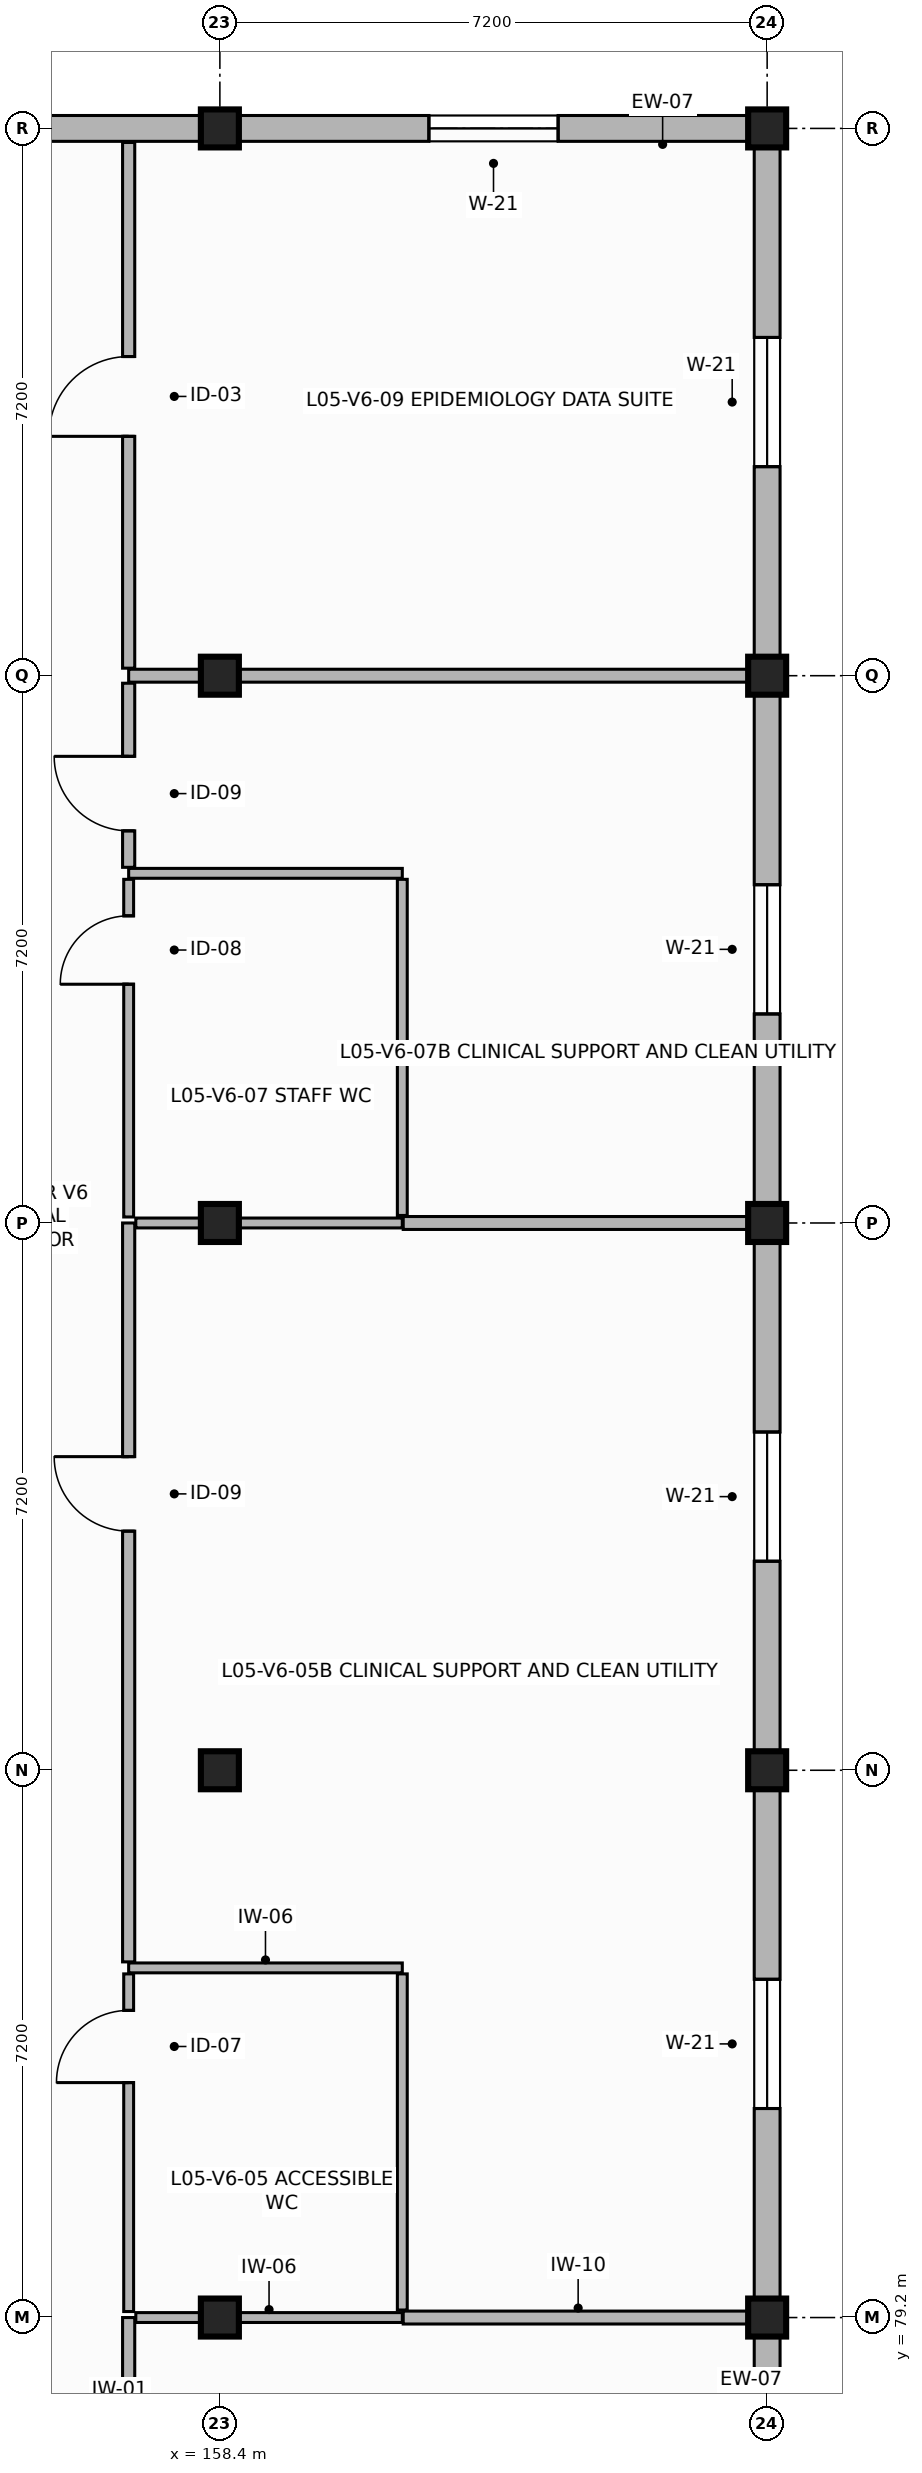
"""IFC4 building model, lengths in metres.
Left out: names, types, materials, properties, quantities, classifications, styles, units other than length and angle.
Written with IfcOpenShell. Run it as: python <this file> out.ifc"""

import sys

from ifc_helpers import new_model, si_unit, direction, frame, frame_2d, origin, origin_2d, place, context, subcontext, project, spatial, rectangle, extrude, element, fill, save


model = new_model("IFC4")
c1 = context("Model", 3, precision=1e-05, world=origin(), true_north=direction((0.0, 1.0)))
c2 = subcontext(c1, "Body", "Model", "MODEL_VIEW")
j1 = project(units=[si_unit("LENGTHUNIT", "METRE"), si_unit("PLANEANGLEUNIT", "RADIAN")], contexts=[c1])
p1 = place(None, origin())
s1 = spatial("IfcSite", under=j1, at=p1, CompositionType="ELEMENT")
p2 = place(p1, origin())
s2 = spatial("IfcBuilding", under=s1, at=p2, CompositionType="ELEMENT")
p3 = place(p2, frame((0.0, 0.0, 19.7)))
s3 = spatial("IfcBuildingStorey", under=s2, at=p3, CompositionType="ELEMENT", Elevation=19.7)
for number, where, z_axis, x_axis in (
    (1, (158.4, 79.2, 0.0), (0.0, 0.0, 1.0), (1.0, 0.0, 0.0)),
    (2, (158.4, 86.4, 0.0), (0.0, 0.0, 1.0), (1.0, 0.0, 0.0)),
    (3, (158.4, 93.6, 0.0), (0.0, 0.0, 1.0), (1.0, 0.0, 0.0)),
    (4, (158.4, 100.8, 0.0), (0.0, 0.0, 1.0), (1.0, 0.0, 0.0)),
    (5, (158.4, 108.0, 0.0), (0.0, 0.0, 1.0), (1.0, 0.0, 0.0)),
    (6, (165.6, 79.2, 0.0), (0.0, 0.0, 1.0), (1.0, 0.0, 0.0)),
    (7, (165.6, 86.4, 0.0), (0.0, 0.0, 1.0), (1.0, 0.0, 0.0)),
    (8, (165.6, 93.6, 0.0), (0.0, 0.0, 1.0), (1.0, 0.0, 0.0)),
    (9, (165.6, 100.8, 0.0), (0.0, 0.0, 1.0), (1.0, 0.0, 0.0)),
    (10, (165.6, 108.0, 0.0), (0.0, 0.0, 1.0), (1.0, 0.0, 0.0)),
):
    element("IfcColumn", number, at=place(p3, frame(where, z_axis=z_axis, x_axis=x_axis)), inside=s3, PredefinedType="COLUMN", context=c2, shape_type="SweptSolid", body=[
        extrude(rectangle(XDim=0.5, YDim=0.5, at=origin_2d()), origin(), (0.0, 0.0, 1.0), 3.46),
    ])
p4 = place(p3, frame((165.6, 72.0, 0.0), z_axis=(0.0, 0.0, 1.0), x_axis=(0.0, 1.0, 0.0)))
e11 = element("IfcWall", 11, at=p4, inside=s3, PredefinedType="SOLIDWALL", context=c2, shape_type="SweptSolid", body=[
    extrude(rectangle(XDim=7.2, YDim=0.34, at=frame_2d((3.6, 0.0))), origin(), (0.0, 0.0, 1.0), 2.79),
])
p5 = place(p4, frame((2.75, 0.0, 0.85)))
e12 = element("IfcOpeningElement", 12, at=p5, cuts=e11, PredefinedType="OPENING", context=c2, shape_type="SweptSolid", body=[
    extrude(rectangle(XDim=1.7, YDim=1.65, at=frame_2d((0.85, 0.825))), frame((0.0, 0.18, 0.0), z_axis=(0.0, -1.0, 0.0), x_axis=(1.0, 0.0, 0.0)), (0.0, 0.0, 1.0), 0.36),
])
p6 = place(p3, frame((165.6, 79.2, 0.0), z_axis=(0.0, 0.0, 1.0), x_axis=(0.0, 1.0, 0.0)))
e13 = element("IfcWall", 13, at=p6, inside=s3, PredefinedType="SOLIDWALL", context=c2, shape_type="SweptSolid", body=[
    extrude(rectangle(XDim=7.2, YDim=0.34, at=frame_2d((3.6, 0.0))), origin(), (0.0, 0.0, 1.0), 2.79),
])
p7 = place(p6, frame((2.75, 0.0, 0.85)))
e14 = element("IfcOpeningElement", 14, at=p7, cuts=e13, PredefinedType="OPENING", context=c2, shape_type="SweptSolid", body=[
    extrude(rectangle(XDim=1.7, YDim=1.65, at=frame_2d((0.85, 0.825))), frame((0.0, 0.18, 0.0), z_axis=(0.0, -1.0, 0.0), x_axis=(1.0, 0.0, 0.0)), (0.0, 0.0, 1.0), 0.36),
])
p8 = place(p3, frame((165.6, 86.4, 0.0), z_axis=(0.0, 0.0, 1.0), x_axis=(0.0, 1.0, 0.0)))
e15 = element("IfcWall", 15, at=p8, inside=s3, PredefinedType="SOLIDWALL", context=c2, shape_type="SweptSolid", body=[
    extrude(rectangle(XDim=7.2, YDim=0.34, at=frame_2d((3.6, 0.0))), origin(), (0.0, 0.0, 1.0), 2.79),
])
p9 = place(p8, frame((2.75, 0.0, 0.85)))
e16 = element("IfcOpeningElement", 16, at=p9, cuts=e15, PredefinedType="OPENING", context=c2, shape_type="SweptSolid", body=[
    extrude(rectangle(XDim=1.7, YDim=1.65, at=frame_2d((0.85, 0.825))), frame((0.0, 0.18, 0.0), z_axis=(0.0, -1.0, 0.0), x_axis=(1.0, 0.0, 0.0)), (0.0, 0.0, 1.0), 0.36),
])
p10 = place(p3, frame((165.6, 93.6, 0.0), z_axis=(0.0, 0.0, 1.0), x_axis=(0.0, 1.0, 0.0)))
e17 = element("IfcWall", 17, at=p10, inside=s3, PredefinedType="SOLIDWALL", context=c2, shape_type="SweptSolid", body=[
    extrude(rectangle(XDim=7.2, YDim=0.34, at=frame_2d((3.6, 0.0))), origin(), (0.0, 0.0, 1.0), 2.79),
])
p11 = place(p10, frame((2.75, 0.0, 0.85)))
e18 = element("IfcOpeningElement", 18, at=p11, cuts=e17, PredefinedType="OPENING", context=c2, shape_type="SweptSolid", body=[
    extrude(rectangle(XDim=1.7, YDim=1.65, at=frame_2d((0.85, 0.825))), frame((0.0, 0.18, 0.0), z_axis=(0.0, -1.0, 0.0), x_axis=(1.0, 0.0, 0.0)), (0.0, 0.0, 1.0), 0.36),
])
p12 = place(p3, frame((165.6, 100.8, 0.0), z_axis=(0.0, 0.0, 1.0), x_axis=(0.0, 1.0, 0.0)))
e19 = element("IfcWall", 19, at=p12, inside=s3, PredefinedType="SOLIDWALL", context=c2, shape_type="SweptSolid", body=[
    extrude(rectangle(XDim=7.2, YDim=0.34, at=frame_2d((3.6, 0.0))), origin(), (0.0, 0.0, 1.0), 2.79),
])
p13 = place(p12, frame((2.75, 0.0, 0.85)))
e20 = element("IfcOpeningElement", 20, at=p13, cuts=e19, PredefinedType="OPENING", context=c2, shape_type="SweptSolid", body=[
    extrude(rectangle(XDim=1.7, YDim=1.65, at=frame_2d((0.85, 0.825))), frame((0.0, 0.18, 0.0), z_axis=(0.0, -1.0, 0.0), x_axis=(1.0, 0.0, 0.0)), (0.0, 0.0, 1.0), 0.36),
])
p14 = place(p3, frame((165.6, 108.0, 0.0), z_axis=(0.0, 0.0, 1.0), x_axis=(-1.0, 0.0, 0.0)))
e21 = element("IfcWall", 21, at=p14, inside=s3, PredefinedType="SOLIDWALL", context=c2, shape_type="SweptSolid", body=[
    extrude(rectangle(XDim=7.2, YDim=0.34, at=frame_2d((3.6, 0.0))), origin(), (0.0, 0.0, 1.0), 2.79),
])
p15 = place(p14, frame((2.75, 0.0, 0.85)))
e22 = element("IfcOpeningElement", 22, at=p15, cuts=e21, PredefinedType="OPENING", context=c2, shape_type="SweptSolid", body=[
    extrude(rectangle(XDim=1.7, YDim=1.65, at=frame_2d((0.85, 0.825))), frame((0.0, 0.18, 0.0), z_axis=(0.0, -1.0, 0.0), x_axis=(1.0, 0.0, 0.0)), (0.0, 0.0, 1.0), 0.36),
])
p16 = place(p3, frame((158.4, 108.0, 0.0), z_axis=(0.0, 0.0, 1.0), x_axis=(-1.0, 0.0, 0.0)))
e23 = element("IfcWall", 23, at=p16, inside=s3, PredefinedType="SOLIDWALL", context=c2, shape_type="SweptSolid", body=[
    extrude(rectangle(XDim=7.2, YDim=0.34, at=frame_2d((3.6, 0.0))), origin(), (0.0, 0.0, 1.0), 2.79),
])
p17 = place(p3, frame((157.2, 72.185, 0.0), z_axis=(0.0, 0.0, 1.0), x_axis=(0.0, 1.0, 0.0)))
e24 = element("IfcWall", 24, at=p17, inside=s3, PredefinedType="PARTITIONING", context=c2, shape_type="SweptSolid", body=[
    extrude(rectangle(XDim=7.015, YDim=0.16, at=frame_2d((3.507, 0.0))), origin(), (0.0, 0.0, 1.0), 2.78),
])
p18 = place(p17, frame((3.017, 0.0, 0.0)))
e25 = element("IfcOpeningElement", 25, at=p18, cuts=e24, PredefinedType="OPENING", context=c2, shape_type="SweptSolid", body=[
    extrude(rectangle(XDim=0.98, YDim=2.15, at=frame_2d((0.49, 1.075))), frame((0.0, 0.09, 0.0), z_axis=(0.0, -1.0, 0.0), x_axis=(1.0, 0.0, 0.0)), (0.0, 0.0, 1.0), 0.18),
])
p19 = place(p3, frame((157.294, 79.2, 0.0), z_axis=(0.0, 0.0, 1.0), x_axis=(1.0, 0.0, 0.0)))
e26 = element("IfcWall", 26, at=p19, inside=s3, PredefinedType="PARTITIONING", context=c2, shape_type="SweptSolid", body=[
    extrude(rectangle(XDim=3.506, YDim=0.13, at=frame_2d((1.753, 0.0))), origin(), (0.0, 0.0, 1.0), 2.78),
])
p20 = place(p3, frame((160.812, 79.2, 0.0), z_axis=(0.0, 0.0, 1.0), x_axis=(1.0, 0.0, 0.0)))
e27 = element("IfcWall", 27, at=p20, inside=s3, PredefinedType="PARTITIONING", context=c2, shape_type="SweptSolid", body=[
    extrude(rectangle(XDim=4.603, YDim=0.17, at=frame_2d((2.302, 0.0))), origin(), (0.0, 0.0, 1.0), 2.78),
])
p21 = place(p3, frame((157.2, 83.8, 0.0), z_axis=(0.0, 0.0, 1.0), x_axis=(1.0, 0.0, 0.0)))
e28 = element("IfcWall", 28, at=p21, inside=s3, PredefinedType="PARTITIONING", context=c2, shape_type="SweptSolid", body=[
    extrude(rectangle(XDim=3.6, YDim=0.13, at=frame_2d((1.8, 0.0))), origin(), (0.0, 0.0, 1.0), 2.78),
])
p22 = place(p3, frame((160.8, 83.721, 0.0), z_axis=(0.0, 0.0, 1.0), x_axis=(0.0, -1.0, 0.0)))
e29 = element("IfcWall", 29, at=p22, inside=s3, PredefinedType="PARTITIONING", context=c2, shape_type="SweptSolid", body=[
    extrude(rectangle(XDim=4.422, YDim=0.13, at=frame_2d((2.211, 0.0))), origin(), (0.0, 0.0, 1.0), 2.78),
])
p23 = place(p3, frame((157.2, 79.279, 0.0), z_axis=(0.0, 0.0, 1.0), x_axis=(0.0, 1.0, 0.0)))
e30 = element("IfcWall", 30, at=p23, inside=s3, PredefinedType="PARTITIONING", context=c2, shape_type="SweptSolid", body=[
    extrude(rectangle(XDim=4.442, YDim=0.13, at=frame_2d((2.221, 0.0))), origin(), (0.0, 0.0, 1.0), 2.78),
])
p24 = place(p23, frame((3.012, 0.0, 0.0)))
e31 = element("IfcOpeningElement", 31, at=p24, cuts=e30, PredefinedType="OPENING", context=c2, shape_type="SweptSolid", body=[
    extrude(rectangle(XDim=0.95, YDim=2.1, at=frame_2d((0.475, 1.05))), frame((0.0, 0.075, 0.0), z_axis=(0.0, -1.0, 0.0), x_axis=(1.0, 0.0, 0.0)), (0.0, 0.0, 1.0), 0.15),
])
p25 = place(p3, frame((157.2, 83.879, 0.0), z_axis=(0.0, 0.0, 1.0), x_axis=(0.0, 1.0, 0.0)))
e32 = element("IfcWall", 32, at=p25, inside=s3, PredefinedType="PARTITIONING", context=c2, shape_type="SweptSolid", body=[
    extrude(rectangle(XDim=9.721, YDim=0.16, at=frame_2d((4.861, 0.0))), origin(), (0.0, 0.0, 1.0), 2.78),
])
p26 = place(p25, frame((5.667, 0.0, 0.0)))
e33 = element("IfcOpeningElement", 33, at=p26, cuts=e32, PredefinedType="OPENING", context=c2, shape_type="SweptSolid", body=[
    extrude(rectangle(XDim=0.98, YDim=2.15, at=frame_2d((0.49, 1.075))), frame((0.0, 0.09, 0.0), z_axis=(0.0, -1.0, 0.0), x_axis=(1.0, 0.0, 0.0)), (0.0, 0.0, 1.0), 0.18),
])
p27 = place(p3, frame((157.294, 93.6, 0.0), z_axis=(0.0, 0.0, 1.0), x_axis=(1.0, 0.0, 0.0)))
e34 = element("IfcWall", 34, at=p27, inside=s3, PredefinedType="PARTITIONING", context=c2, shape_type="SweptSolid", body=[
    extrude(rectangle(XDim=3.506, YDim=0.13, at=frame_2d((1.753, 0.0))), origin(), (0.0, 0.0, 1.0), 2.78),
])
p28 = place(p3, frame((160.812, 93.6, 0.0), z_axis=(0.0, 0.0, 1.0), x_axis=(1.0, 0.0, 0.0)))
e35 = element("IfcWall", 35, at=p28, inside=s3, PredefinedType="PARTITIONING", context=c2, shape_type="SweptSolid", body=[
    extrude(rectangle(XDim=4.603, YDim=0.17, at=frame_2d((2.302, 0.0))), origin(), (0.0, 0.0, 1.0), 2.78),
])
p29 = place(p3, frame((157.2, 98.2, 0.0), z_axis=(0.0, 0.0, 1.0), x_axis=(1.0, 0.0, 0.0)))
e36 = element("IfcWall", 36, at=p29, inside=s3, PredefinedType="PARTITIONING", context=c2, shape_type="SweptSolid", body=[
    extrude(rectangle(XDim=3.6, YDim=0.13, at=frame_2d((1.8, 0.0))), origin(), (0.0, 0.0, 1.0), 2.78),
])
p30 = place(p3, frame((160.8, 98.121, 0.0), z_axis=(0.0, 0.0, 1.0), x_axis=(0.0, -1.0, 0.0)))
e37 = element("IfcWall", 37, at=p30, inside=s3, PredefinedType="PARTITIONING", context=c2, shape_type="SweptSolid", body=[
    extrude(rectangle(XDim=4.422, YDim=0.13, at=frame_2d((2.211, 0.0))), origin(), (0.0, 0.0, 1.0), 2.78),
])
p31 = place(p3, frame((157.2, 93.679, 0.0), z_axis=(0.0, 0.0, 1.0), x_axis=(0.0, 1.0, 0.0)))
e38 = element("IfcWall", 38, at=p31, inside=s3, PredefinedType="PARTITIONING", context=c2, shape_type="SweptSolid", body=[
    extrude(rectangle(XDim=4.442, YDim=0.13, at=frame_2d((2.221, 0.0))), origin(), (0.0, 0.0, 1.0), 2.78),
])
p32 = place(p31, frame((3.062, 0.0, 0.0)))
e39 = element("IfcOpeningElement", 39, at=p32, cuts=e38, PredefinedType="OPENING", context=c2, shape_type="SweptSolid", body=[
    extrude(rectangle(XDim=0.9, YDim=2.1, at=frame_2d((0.45, 1.05))), frame((0.0, 0.075, 0.0), z_axis=(0.0, -1.0, 0.0), x_axis=(1.0, 0.0, 0.0)), (0.0, 0.0, 1.0), 0.15),
])
p33 = place(p3, frame((157.2, 100.8, 0.0), z_axis=(0.0, 0.0, 1.0), x_axis=(1.0, 0.0, 0.0)))
e40 = element("IfcWall", 40, at=p33, inside=s3, PredefinedType="PARTITIONING", context=c2, shape_type="SweptSolid", body=[
    extrude(rectangle(XDim=8.215, YDim=0.17, at=frame_2d((4.107, 0.0))), origin(), (0.0, 0.0, 1.0), 2.78),
])
p34 = place(p3, frame((157.2, 98.279, 0.0), z_axis=(0.0, 0.0, 1.0), x_axis=(0.0, 1.0, 0.0)))
e41 = element("IfcWall", 41, at=p34, inside=s3, PredefinedType="PARTITIONING", context=c2, shape_type="SweptSolid", body=[
    extrude(rectangle(XDim=2.422, YDim=0.16, at=frame_2d((1.211, 0.0))), origin(), (0.0, 0.0, 1.0), 2.78),
])
p35 = place(p34, frame((0.48, 0.0, 0.0)))
e42 = element("IfcOpeningElement", 42, at=p35, cuts=e41, PredefinedType="OPENING", context=c2, shape_type="SweptSolid", body=[
    extrude(rectangle(XDim=0.98, YDim=2.15, at=frame_2d((0.49, 1.075))), frame((0.0, 0.09, 0.0), z_axis=(0.0, -1.0, 0.0), x_axis=(1.0, 0.0, 0.0)), (0.0, 0.0, 1.0), 0.18),
])
p36 = place(p3, frame((157.2, 100.899, 0.0), z_axis=(0.0, 0.0, 1.0), x_axis=(0.0, 1.0, 0.0)))
e43 = element("IfcWall", 43, at=p36, inside=s3, PredefinedType="PARTITIONING", context=c2, shape_type="SweptSolid", body=[
    extrude(rectangle(XDim=6.916, YDim=0.16, at=frame_2d((3.458, 0.0))), origin(), (0.0, 0.0, 1.0), 2.78),
])
p37 = place(p36, frame((3.05, 0.0, 0.0)))
e44 = element("IfcOpeningElement", 44, at=p37, cuts=e43, PredefinedType="OPENING", context=c2, shape_type="SweptSolid", body=[
    extrude(rectangle(XDim=1.05, YDim=2.15, at=frame_2d((0.525, 1.075))), frame((0.0, 0.09, 0.0), z_axis=(0.0, -1.0, 0.0), x_axis=(1.0, 0.0, 0.0)), (0.0, 0.0, 1.0), 0.18),
])
p38 = place(p7, origin())
e45 = element("IfcWindow", 45, at=p38, inside=s3, PartitioningType="SINGLE_PANEL", PredefinedType="WINDOW", context=c2, shape_type="SweptSolid", body=[
    extrude(rectangle(XDim=1.7, YDim=1.65, at=frame_2d((0.85, 0.825))), frame((0.0, 0.03, 0.0), z_axis=(0.0, -1.0, 0.0), x_axis=(1.0, 0.0, 0.0)), (0.0, 0.0, 1.0), 0.06),
])
fill(e14, e45)
p39 = place(p9, origin())
e46 = element("IfcWindow", 46, at=p39, inside=s3, PartitioningType="SINGLE_PANEL", PredefinedType="WINDOW", context=c2, shape_type="SweptSolid", body=[
    extrude(rectangle(XDim=1.7, YDim=1.65, at=frame_2d((0.85, 0.825))), frame((0.0, 0.03, 0.0), z_axis=(0.0, -1.0, 0.0), x_axis=(1.0, 0.0, 0.0)), (0.0, 0.0, 1.0), 0.06),
])
fill(e16, e46)
p40 = place(p11, origin())
e47 = element("IfcWindow", 47, at=p40, inside=s3, PartitioningType="SINGLE_PANEL", PredefinedType="WINDOW", context=c2, shape_type="SweptSolid", body=[
    extrude(rectangle(XDim=1.7, YDim=1.65, at=frame_2d((0.85, 0.825))), frame((0.0, 0.03, 0.0), z_axis=(0.0, -1.0, 0.0), x_axis=(1.0, 0.0, 0.0)), (0.0, 0.0, 1.0), 0.06),
])
fill(e18, e47)
p41 = place(p13, origin())
e48 = element("IfcWindow", 48, at=p41, inside=s3, PartitioningType="SINGLE_PANEL", PredefinedType="WINDOW", context=c2, shape_type="SweptSolid", body=[
    extrude(rectangle(XDim=1.7, YDim=1.65, at=frame_2d((0.85, 0.825))), frame((0.0, 0.03, 0.0), z_axis=(0.0, -1.0, 0.0), x_axis=(1.0, 0.0, 0.0)), (0.0, 0.0, 1.0), 0.06),
])
fill(e20, e48)
p42 = place(p15, origin())
e49 = element("IfcWindow", 49, at=p42, inside=s3, PartitioningType="SINGLE_PANEL", PredefinedType="WINDOW", context=c2, shape_type="SweptSolid", body=[
    extrude(rectangle(XDim=1.7, YDim=1.65, at=frame_2d((0.85, 0.825))), frame((0.0, 0.03, 0.0), z_axis=(0.0, -1.0, 0.0), x_axis=(1.0, 0.0, 0.0)), (0.0, 0.0, 1.0), 0.06),
])
fill(e22, e49)
p43 = place(p24, origin())
e50 = element("IfcDoor", 50, at=p43, inside=s3, OperationType="SINGLE_SWING_LEFT", PredefinedType="DOOR", context=c2, shape_type="SweptSolid", body=[
    extrude(rectangle(XDim=0.95, YDim=2.1, at=frame_2d((0.475, 1.05))), frame((0.0, 0.025, 0.0), z_axis=(0.0, -1.0, 0.0), x_axis=(1.0, 0.0, 0.0)), (0.0, 0.0, 1.0), 0.05),
])
fill(e31, e50)
p44 = place(p26, origin())
e51 = element("IfcDoor", 51, at=p44, inside=s3, OperationType="SINGLE_SWING_RIGHT", PredefinedType="DOOR", context=c2, shape_type="SweptSolid", body=[
    extrude(rectangle(XDim=0.98, YDim=2.15, at=frame_2d((0.49, 1.075))), frame((0.0, 0.025, 0.0), z_axis=(0.0, -1.0, 0.0), x_axis=(1.0, 0.0, 0.0)), (0.0, 0.0, 1.0), 0.05),
])
fill(e33, e51)
p45 = place(p32, origin())
e52 = element("IfcDoor", 52, at=p45, inside=s3, OperationType="SINGLE_SWING_LEFT", PredefinedType="DOOR", context=c2, shape_type="SweptSolid", body=[
    extrude(rectangle(XDim=0.9, YDim=2.1, at=frame_2d((0.45, 1.05))), frame((0.0, 0.025, 0.0), z_axis=(0.0, -1.0, 0.0), x_axis=(1.0, 0.0, 0.0)), (0.0, 0.0, 1.0), 0.05),
])
fill(e39, e52)
p46 = place(p35, origin())
e53 = element("IfcDoor", 53, at=p46, inside=s3, OperationType="SINGLE_SWING_RIGHT", PredefinedType="DOOR", context=c2, shape_type="SweptSolid", body=[
    extrude(rectangle(XDim=0.98, YDim=2.15, at=frame_2d((0.49, 1.075))), frame((0.0, 0.025, 0.0), z_axis=(0.0, -1.0, 0.0), x_axis=(1.0, 0.0, 0.0)), (0.0, 0.0, 1.0), 0.05),
])
fill(e42, e53)
p47 = place(p37, origin())
e54 = element("IfcDoor", 54, at=p47, inside=s3, OperationType="SINGLE_SWING_LEFT", PredefinedType="DOOR", context=c2, shape_type="SweptSolid", body=[
    extrude(rectangle(XDim=1.05, YDim=2.15, at=frame_2d((0.525, 1.075))), frame((0.0, 0.025, 0.0), z_axis=(0.0, -1.0, 0.0), x_axis=(1.0, 0.0, 0.0)), (0.0, 0.0, 1.0), 0.05),
])
fill(e44, e54)
save(model, sys.argv[1])
